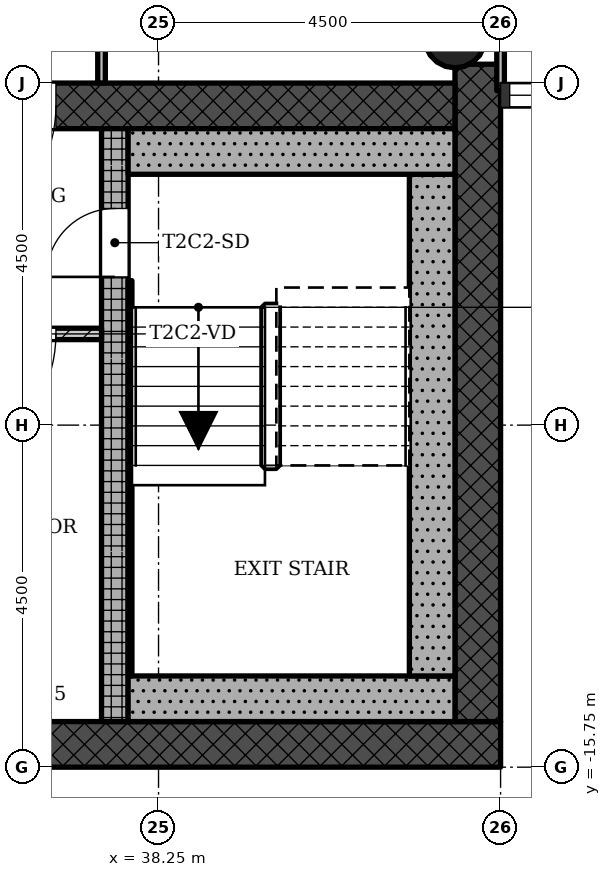
"""IFC4 building model, lengths in metres.
Left out: names, types, materials, properties, quantities, classifications, styles, units other than length and angle.
Written with IfcOpenShell. Run it as: python <this file> out.ifc"""

import sys

from ifc_helpers import new_model, si_unit, direction, frame, frame_2d, origin, origin_2d, place, context, subcontext, project, spatial, rectangle, hollow_circle, extrude, element, fill, save


model = new_model("IFC4")
c1 = context("Model", 3, precision=1e-05, world=origin(), true_north=direction((0.0, 1.0)))
c2 = subcontext(c1, "Body", "Model", "MODEL_VIEW")
j1 = project(units=[si_unit("LENGTHUNIT", "METRE"), si_unit("PLANEANGLEUNIT", "RADIAN")], contexts=[c1])
p1 = place(None, origin())
s1 = spatial("IfcSite", under=j1, at=p1, CompositionType="ELEMENT")
p2 = place(p1, origin())
s2 = spatial("IfcBuilding", under=s1, at=p2, CompositionType="ELEMENT")
p3 = place(p2, frame((0.0, 0.0, 199.4)))
s3 = spatial("IfcBuildingStorey", under=s2, at=p3, CompositionType="ELEMENT", Elevation=199.4)
p4 = place(p3, frame((29.85, -15.45, 0.0), z_axis=(0.0, 0.0, 1.0), x_axis=(1.0, 0.0, 0.0)))
e1 = element("IfcWall", 1, at=p4, inside=s3, PredefinedType="SHEAR", context=c2, shape_type="SweptSolid", body=[
    extrude(rectangle(XDim=12.9, YDim=0.6, at=frame_2d((6.45, 0.0))), origin(), (0.0, 0.0, 1.0), 3.4),
])
p5 = place(p4, frame((5.7, 0.0, 0.45)))
e2 = element("IfcOpeningElement", 2, at=p5, cuts=e1, PredefinedType="OPENING", context=c2, shape_type="SweptSolid", body=[
    extrude(rectangle(XDim=0.9, YDim=2.4, at=frame_2d((0.45, 1.2))), frame((0.0, 0.31, 0.0), z_axis=(0.0, -1.0, 0.0), x_axis=(1.0, 0.0, 0.0)), (0.0, 0.0, 1.0), 0.62),
])
p6 = place(p3, frame((42.45, -15.15, 0.0), z_axis=(0.0, 0.0, 1.0), x_axis=(0.0, 1.0, 0.0)))
e3 = element("IfcWall", 3, at=p6, inside=s3, PredefinedType="SHEAR", context=c2, shape_type="SweptSolid", body=[
    extrude(rectangle(XDim=8.648, YDim=0.6, at=frame_2d((4.324, 0.0))), origin(), (0.0, 0.0, 1.0), 3.4),
])
p7 = place(p3, frame((42.15, -7.05, 0.0), z_axis=(0.0, 0.0, 1.0), x_axis=(-1.0, 0.0, 0.0)))
e4 = element("IfcWall", 4, at=p7, inside=s3, PredefinedType="SHEAR", context=c2, shape_type="SweptSolid", body=[
    extrude(rectangle(XDim=12.9, YDim=0.6, at=frame_2d((6.45, 0.0))), origin(), (0.0, 0.0, 1.0), 3.4),
])
p8 = place(p7, frame((5.25, 0.0, 0.0)))
e5 = element("IfcOpeningElement", 5, at=p8, cuts=e4, PredefinedType="OPENING", context=c2, shape_type="SweptSolid", body=[
    extrude(rectangle(XDim=1.8, YDim=2.1, at=frame_2d((0.9, 1.05))), frame((0.0, 0.31, 0.0), z_axis=(0.0, -1.0, 0.0), x_axis=(1.0, 0.0, 0.0)), (0.0, 0.0, 1.0), 0.62),
])
p9 = place(p3, frame((37.675, -15.15, 0.0), z_axis=(0.0, 0.0, 1.0), x_axis=(0.0, 1.0, 0.0)))
e6 = element("IfcWall", 6, at=p9, inside=s3, PredefinedType="SHEAR", context=c2, shape_type="SweptSolid", body=[
    extrude(rectangle(XDim=7.8, YDim=0.35, at=frame_2d((3.9, 0.0))), origin(), (0.0, 0.0, 1.0), 3.4),
])
p10 = place(p9, frame((5.85, 0.0, 0.0)))
e7 = element("IfcOpeningElement", 7, at=p10, cuts=e6, PredefinedType="OPENING", context=c2, shape_type="SweptSolid", body=[
    extrude(rectangle(XDim=0.9, YDim=2.1, at=frame_2d((0.45, 1.05))), frame((0.0, 0.185, 0.0), z_axis=(0.0, -1.0, 0.0), x_axis=(1.0, 0.0, 0.0)), (0.0, 0.0, 1.0), 0.37),
])
p11 = place(p3, frame((42.15, -6.15, 0.0), z_axis=(0.0, 0.0, 1.0), x_axis=(1.0, 0.0, 0.0)))
e8 = element("IfcColumn", 8, at=p11, inside=s3, PredefinedType="COLUMN", context=c2, shape_type="SweptSolid", body=[
    extrude(hollow_circle(Radius=0.4, WallThickness=0.028, at=origin_2d()), origin(), (0.0, 0.0, 1.0), 3.4),
])
p12 = place(p3, frame((34.5, -10.05, 0.0), z_axis=(0.0, 0.0, 1.0), x_axis=(1.0, 0.0, 0.0)))
e9 = element("IfcWall", 9, at=p12, inside=s3, PredefinedType="PARTITIONING", context=c2, shape_type="SweptSolid", body=[
    extrude(rectangle(XDim=3.0, YDim=0.15, at=frame_2d((1.5, 0.0))), origin(), (0.0, 0.0, 1.0), 3.0),
])
p13 = place(p12, frame((0.6, 0.0, 0.0)))
e10 = element("IfcOpeningElement", 10, at=p13, cuts=e9, PredefinedType="OPENING", context=c2, shape_type="SweptSolid", body=[
    extrude(rectangle(XDim=1.8, YDim=2.1, at=frame_2d((0.9, 1.05))), frame((0.0, 0.085, 0.0), z_axis=(0.0, -1.0, 0.0), x_axis=(1.0, 0.0, 0.0)), (0.0, 0.0, 1.0), 0.17),
])
p14 = place(p3, frame((42.75, -6.85, 0.0), z_axis=(0.0, 0.0, 1.0), x_axis=(0.0, 1.0, 0.0)))
e11 = element("IfcWall", 11, at=p14, inside=s3, PredefinedType="PARTITIONING", context=c2, shape_type="SweptSolid", body=[
    extrude(rectangle(XDim=5.95, YDim=0.1, at=frame_2d((2.975, 0.0))), origin(), (0.0, 0.0, 1.0), 3.0),
])
p15 = place(p3, frame((37.5, -6.75, 0.0), z_axis=(0.0, 0.0, 1.0), x_axis=(0.0, 1.0, 0.0)))
e12 = element("IfcWall", 12, at=p15, inside=s3, PredefinedType="PARTITIONING", context=c2, shape_type="SweptSolid", body=[
    extrude(rectangle(XDim=2.25, YDim=0.1, at=frame_2d((1.125, 0.0))), origin(), (0.0, 0.0, 1.0), 3.0),
])
p16 = place(p3, frame((37.85, -14.85, 0.0), z_axis=(0.0, 0.0, 1.0), x_axis=(1.0, 0.0, 0.0)))
e13 = element("IfcWall", 13, at=p16, inside=s3, PredefinedType="SHEAR", context=c2, shape_type="SweptSolid", body=[
    extrude(rectangle(XDim=4.3, YDim=0.6, at=frame_2d((2.15, 0.0))), origin(), (0.0, 0.0, 1.0), 3.4),
])
p17 = place(p3, frame((41.85, -7.95, 0.0), z_axis=(0.0, 0.0, 1.0), x_axis=(0.0, -1.0, 0.0)))
e14 = element("IfcWall", 14, at=p17, inside=s3, PredefinedType="SHEAR", context=c2, shape_type="SweptSolid", body=[
    extrude(rectangle(XDim=6.6, YDim=0.6, at=frame_2d((3.3, 0.0))), origin(), (0.0, 0.0, 1.0), 3.4),
])
p18 = place(p3, frame((37.85, -7.65, 0.0), z_axis=(0.0, 0.0, 1.0), x_axis=(1.0, 0.0, 0.0)))
e15 = element("IfcWall", 15, at=p18, inside=s3, PredefinedType="SHEAR", context=c2, shape_type="SweptSolid", body=[
    extrude(rectangle(XDim=4.3, YDim=0.6, at=frame_2d((2.15, 0.0))), origin(), (0.0, 0.0, 1.0), 3.4),
])
p19 = place(p3, frame((37.875, -9.35, 0.0), z_axis=(0.0, 0.0, 1.0), x_axis=(0.0, -1.0, 0.0)))
e16 = element("IfcWall", 16, at=p19, inside=s3, PredefinedType="SHEAR", context=c2, shape_type="SweptSolid", body=[
    extrude(rectangle(XDim=5.2, YDim=0.05, at=frame_2d((2.6, 0.0))), origin(), (0.0, 0.0, 1.0), 3.4),
])
p20 = place(p13, origin())
e17 = element("IfcDoor", 17, at=p20, inside=s3, OperationType="SINGLE_SWING_LEFT", PredefinedType="DOOR", context=c2, shape_type="SweptSolid", body=[
    extrude(rectangle(XDim=1.8, YDim=2.1, at=frame_2d((0.9, 1.05))), frame((0.0, 0.025, 0.0), z_axis=(0.0, -1.0, 0.0), x_axis=(1.0, 0.0, 0.0)), (0.0, 0.0, 1.0), 0.05),
])
fill(e10, e17)
p21 = place(p10, origin())
e18 = element("IfcDoor", 18, at=p21, inside=s3, OperationType="SINGLE_SWING_RIGHT", PredefinedType="DOOR", context=c2, shape_type="SweptSolid", body=[
    extrude(rectangle(XDim=0.9, YDim=2.1, at=frame_2d((0.45, 1.05))), frame((0.0, 0.025, 0.0), z_axis=(0.0, -1.0, 0.0), x_axis=(1.0, 0.0, 0.0)), (0.0, 0.0, 1.0), 0.05),
])
fill(e7, e18)
p22 = place(p8, origin())
e19 = element("IfcDoor", 19, at=p22, inside=s3, OperationType="SINGLE_SWING_LEFT", PredefinedType="DOOR", context=c2, shape_type="SweptSolid", body=[
    extrude(rectangle(XDim=1.8, YDim=2.1, at=frame_2d((0.9, 1.05))), frame((0.0, 0.025, 0.0), z_axis=(0.0, -1.0, 0.0), x_axis=(1.0, 0.0, 0.0)), (0.0, 0.0, 1.0), 0.05),
])
fill(e5, e19)
save(model, sys.argv[1])
